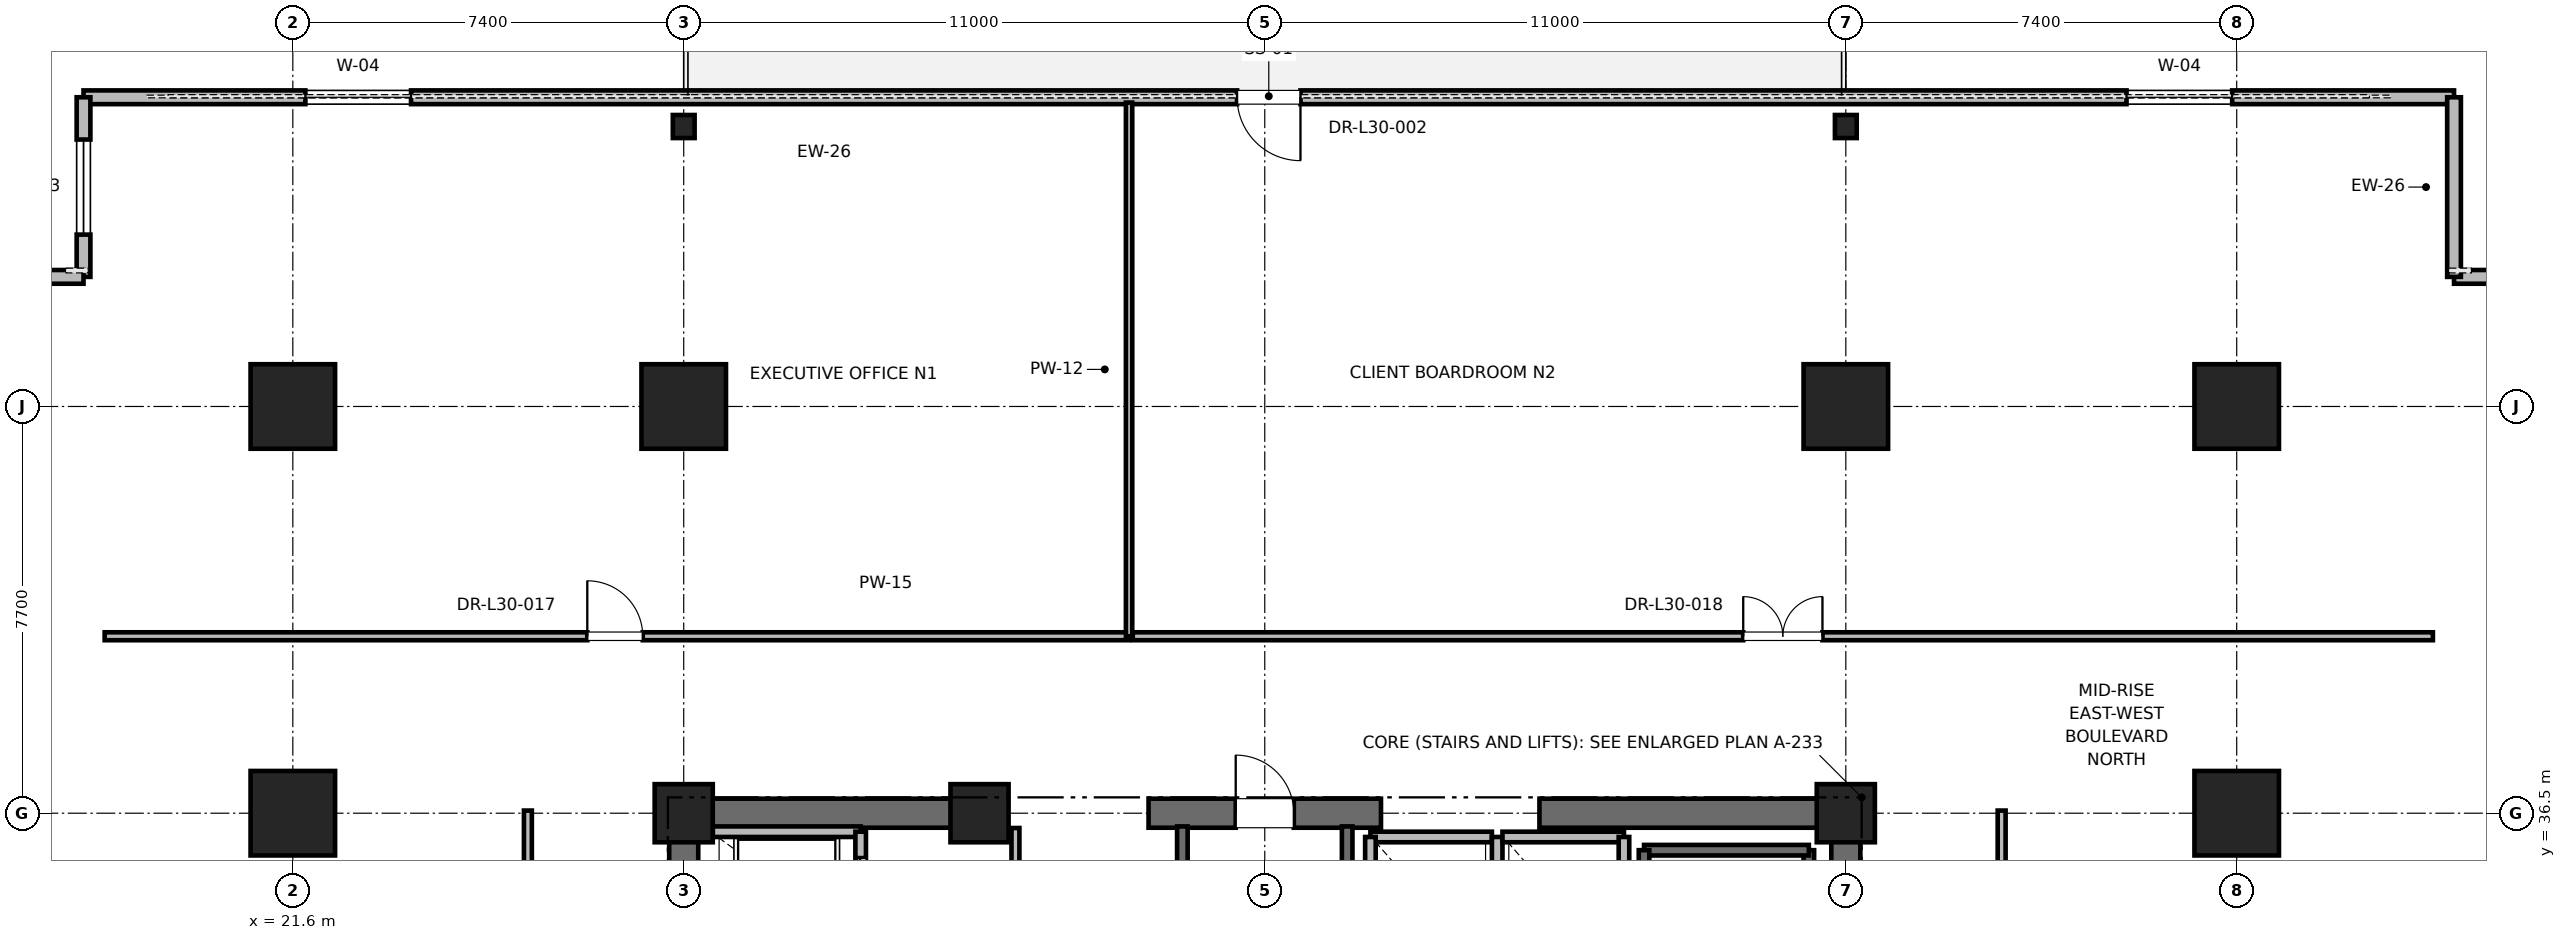
"""IFC4 building model, lengths in metres.
Left out: names, types, materials, properties, quantities, classifications, styles, units other than length and angle.
Written with IfcOpenShell. Run it as: python <this file> out.ifc"""

import sys

from ifc_helpers import new_model, si_unit, direction, frame, frame_2d, origin, origin_2d, place, context, subcontext, project, spatial, rectangle, i_section, extrude, element, fill, save


model = new_model("IFC4")
c1 = context("Model", 3, precision=1e-05, world=origin(), true_north=direction((0.0, 1.0)))
c2 = subcontext(c1, "Body", "Model", "MODEL_VIEW")
j1 = project(units=[si_unit("LENGTHUNIT", "METRE"), si_unit("PLANEANGLEUNIT", "RADIAN")], contexts=[c1])
p1 = place(None, origin())
s1 = spatial("IfcSite", under=j1, at=p1, CompositionType="ELEMENT")
p2 = place(p1, origin())
s2 = spatial("IfcBuilding", under=s1, at=p2, CompositionType="ELEMENT")
p3 = place(p2, frame((0.0, 0.0, 132.4)))
s3 = spatial("IfcBuildingStorey", under=s2, at=p3, CompositionType="ELEMENT", Elevation=132.4)
for number, where, z_axis, x_axis in (
    (1, (29.0, 44.2, 0.0), (0.0, 0.0, 1.0), (1.0, 0.0, 0.0)),
    (2, (51.0, 44.2, 0.0), (0.0, 0.0, 1.0), (1.0, 0.0, 0.0)),
    (3, (21.6, 36.5, 0.0), (0.0, 0.0, 1.0), (1.0, 0.0, 0.0)),
    (4, (58.4, 36.5, 0.0), (0.0, 0.0, 1.0), (1.0, 0.0, 0.0)),
    (5, (21.6, 44.2, 0.0), (0.0, 0.0, 1.0), (1.0, 0.0, 0.0)),
    (6, (58.4, 44.2, 0.0), (0.0, 0.0, 1.0), (1.0, 0.0, 0.0)),
):
    element("IfcColumn", number, at=place(p3, frame(where, z_axis=z_axis, x_axis=x_axis)), inside=s3, PredefinedType="COLUMN", context=c2, shape_type="SweptSolid", body=[
        extrude(rectangle(XDim=1.6, YDim=1.6, at=origin_2d()), origin(), (0.0, 0.0, 1.0), 4.0),
    ])
for number, where, z_axis, x_axis in (
    (7, (29.0, 49.5, 0.0), (0.0, 0.0, 1.0), (1.0, 0.0, 0.0)),
    (8, (51.0, 49.5, 0.0), (0.0, 0.0, 1.0), (1.0, 0.0, 0.0)),
):
    element("IfcColumn", number, at=place(p3, frame(where, z_axis=z_axis, x_axis=x_axis)), inside=s3, PredefinedType="COLUMN", context=c2, shape_type="SweptSolid", body=[
        extrude(i_section(OverallWidth=0.412, OverallDepth=0.437, WebThickness=0.036, FlangeThickness=0.058, FilletRadius=0.015, at=origin_2d()), origin(), (0.0, 0.0, 1.0), 4.0),
    ])
for number, where, z_axis, x_axis in (
    (9, (29.0, 36.5, 0.0), (0.0, 0.0, 1.0), (1.0, 0.0, 0.0)),
    (10, (51.0, 36.5, 0.0), (0.0, 0.0, 1.0), (1.0, 0.0, 0.0)),
    (11, (34.6, 36.5, 0.0), (0.0, 0.0, 1.0), (1.0, 0.0, 0.0)),
):
    element("IfcColumn", number, at=place(p3, frame(where, z_axis=z_axis, x_axis=x_axis)), inside=s3, PredefinedType="PILASTER", context=c2, shape_type="SweptSolid", body=[
        extrude(rectangle(XDim=1.1, YDim=1.1, at=origin_2d()), origin(), (0.0, 0.0, 1.0), 4.0),
    ])
p4 = place(p3, frame((29.0, 36.5, 0.0), z_axis=(0.0, 0.0, 1.0), x_axis=(1.0, 0.0, 0.0)))
e12 = element("IfcWall", 12, at=p4, inside=s3, PredefinedType="SHEAR", context=c2, shape_type="SweptSolid", body=[
    extrude(rectangle(XDim=5.8, YDim=0.55, at=frame_2d((2.9, 0.0))), origin(), (0.0, 0.0, 1.0), 3.775),
])
p5 = place(p3, frame((37.8, 36.5, 0.0), z_axis=(0.0, 0.0, 1.0), x_axis=(1.0, 0.0, 0.0)))
e13 = element("IfcWall", 13, at=p5, inside=s3, PredefinedType="SHEAR", context=c2, shape_type="SweptSolid", body=[
    extrude(rectangle(XDim=4.4, YDim=0.55, at=frame_2d((2.2, 0.0))), origin(), (0.0, 0.0, 1.0), 3.775),
])
p6 = place(p5, frame((1.65, 0.0, 0.0)))
e14 = element("IfcOpeningElement", 14, at=p6, cuts=e13, PredefinedType="OPENING", context=c2, shape_type="SweptSolid", body=[
    extrude(rectangle(XDim=1.1, YDim=2.15, at=frame_2d((0.55, 1.075))), frame((0.0, 0.275, 0.0), z_axis=(0.0, -1.0, 0.0), x_axis=(1.0, 0.0, 0.0)), (0.0, 0.0, 1.0), 0.55),
])
for number, where, z_axis, x_axis in (
    (15, (45.2, 36.5, 0.0), (0.0, 0.0, 1.0), (1.0, 0.0, 0.0)),
    (16, (29.0, 30.7, 0.0), (0.0, 0.0, 1.0), (0.0, 1.0, 0.0)),
):
    element("IfcWall", number, at=place(p3, frame(where, z_axis=z_axis, x_axis=x_axis)), inside=s3, PredefinedType="SHEAR", context=c2, shape_type="SweptSolid", body=[
        extrude(rectangle(XDim=5.8, YDim=0.55, at=frame_2d((2.9, 0.0))), origin(), (0.0, 0.0, 1.0), 3.775),
    ])
p7 = place(p3, frame((51.0, 27.7, 0.0), z_axis=(0.0, 0.0, 1.0), x_axis=(0.0, 1.0, 0.0)))
e17 = element("IfcWall", 17, at=p7, inside=s3, PredefinedType="SHEAR", context=c2, shape_type="SweptSolid", body=[
    extrude(rectangle(XDim=8.8, YDim=0.55, at=frame_2d((4.4, 0.0))), origin(), (0.0, 0.0, 1.0), 3.775),
])
p8 = place(p3, frame((62.514, 50.054, 0.0), z_axis=(0.0, 0.0, 1.0), x_axis=(-1.0, 0.0, 0.0)))
e18 = element("IfcWall", 18, at=p8, inside=s3, PredefinedType="PARAPET", context=c2, shape_type="SweptSolid", body=[
    extrude(rectangle(XDim=44.876, YDim=0.26, at=frame_2d((22.438, 0.0))), origin(), (0.0, 0.0, 1.0), 2.97),
])
p9 = place(p8, frame((4.2, 0.0, 0.85)))
e19 = element("IfcOpeningElement", 19, at=p9, cuts=e18, PredefinedType="OPENING", context=c2, shape_type="SweptSolid", body=[
    extrude(rectangle(XDim=2.0, YDim=2.3, at=frame_2d((1.0, 1.15))), frame((0.0, 0.13, 0.0), z_axis=(0.0, -1.0, 0.0), x_axis=(1.0, 0.0, 0.0)), (0.0, 0.0, 1.0), 0.26),
])
p10 = place(p8, frame((21.838, 0.0, 0.0)))
e20 = element("IfcOpeningElement", 20, at=p10, cuts=e18, PredefinedType="OPENING", context=c2, shape_type="SweptSolid", body=[
    extrude(rectangle(XDim=1.2, YDim=2.2, at=frame_2d((0.6, 1.1))), frame((0.0, 0.13, 0.0), z_axis=(0.0, -1.0, 0.0), x_axis=(1.0, 0.0, 0.0)), (0.0, 0.0, 1.0), 0.26),
])
p11 = place(p8, frame((38.677, 0.0, 0.85)))
e21 = element("IfcOpeningElement", 21, at=p11, cuts=e18, PredefinedType="OPENING", context=c2, shape_type="SweptSolid", body=[
    extrude(rectangle(XDim=2.0, YDim=2.3, at=frame_2d((1.0, 1.15))), frame((0.0, 0.13, 0.0), z_axis=(0.0, -1.0, 0.0), x_axis=(1.0, 0.0, 0.0)), (0.0, 0.0, 1.0), 0.26),
])
p12 = place(p3, frame((66.314, 46.654, 0.0), z_axis=(0.0, 0.0, 1.0), x_axis=(-1.0, 0.0, 0.0)))
e22 = element("IfcWall", 22, at=p12, inside=s3, PredefinedType="PARAPET", context=c2, shape_type="SweptSolid", body=[
    extrude(rectangle(XDim=3.8, YDim=0.26, at=frame_2d((1.9, 0.0))), origin(), (0.0, 0.0, 1.0), 3.775),
])
p13 = place(p12, frame((1.0, 0.0, 0.85)))
e23 = element("IfcOpeningElement", 23, at=p13, cuts=e22, PredefinedType="OPENING", context=c2, shape_type="SweptSolid", body=[
    extrude(rectangle(XDim=1.8, YDim=2.2, at=frame_2d((0.9, 1.1))), frame((0.0, 0.13, 0.0), z_axis=(0.0, -1.0, 0.0), x_axis=(1.0, 0.0, 0.0)), (0.0, 0.0, 1.0), 0.26),
])
p14 = place(p3, frame((62.514, 46.654, 0.0), z_axis=(0.0, 0.0, 1.0), x_axis=(0.0, 1.0, 0.0)))
e24 = element("IfcWall", 24, at=p14, inside=s3, PredefinedType="PARAPET", context=c2, shape_type="SweptSolid", body=[
    extrude(rectangle(XDim=3.4, YDim=0.26, at=frame_2d((1.7, 0.0))), origin(), (0.0, 0.0, 1.0), 3.775),
])
p15 = place(p3, frame((17.638, 50.054, 0.0), z_axis=(0.0, 0.0, 1.0), x_axis=(0.0, -1.0, 0.0)))
e25 = element("IfcWall", 25, at=p15, inside=s3, PredefinedType="PARAPET", context=c2, shape_type="SweptSolid", body=[
    extrude(rectangle(XDim=3.4, YDim=0.26, at=frame_2d((1.7, 0.0))), origin(), (0.0, 0.0, 1.0), 3.775),
])
p16 = place(p15, frame((0.8, 0.0, 0.85)))
e26 = element("IfcOpeningElement", 26, at=p16, cuts=e25, PredefinedType="OPENING", context=c2, shape_type="SweptSolid", body=[
    extrude(rectangle(XDim=1.8, YDim=2.2, at=frame_2d((0.9, 1.1))), frame((0.0, 0.13, 0.0), z_axis=(0.0, -1.0, 0.0), x_axis=(1.0, 0.0, 0.0)), (0.0, 0.0, 1.0), 0.26),
])
p17 = place(p3, frame((17.638, 46.654, 0.0), z_axis=(0.0, 0.0, 1.0), x_axis=(-1.0, 0.0, 0.0)))
e27 = element("IfcWall", 27, at=p17, inside=s3, PredefinedType="PARAPET", context=c2, shape_type="SweptSolid", body=[
    extrude(rectangle(XDim=3.8, YDim=0.26, at=frame_2d((1.9, 0.0))), origin(), (0.0, 0.0, 1.0), 3.775),
])
p18 = place(p3, frame((50.3, 27.65, 0.0), z_axis=(0.0, 0.0, 1.0), x_axis=(0.0, 1.0, 0.0)))
e28 = element("IfcWall", 28, at=p18, inside=s3, PredefinedType="SOLIDWALL", context=c2, shape_type="SweptSolid", body=[
    extrude(rectangle(XDim=8.15, YDim=0.2, at=frame_2d((4.075, 0.0))), origin(), (0.0, 0.0, 1.0), 3.775),
])
p19 = place(p3, frame((47.18, 35.8, 0.0), z_axis=(0.0, 0.0, 1.0), x_axis=(1.0, 0.0, 0.0)))
e29 = element("IfcWall", 29, at=p19, inside=s3, PredefinedType="SOLIDWALL", context=c2, shape_type="SweptSolid", body=[
    extrude(rectangle(XDim=3.12, YDim=0.2, at=frame_2d((1.56, 0.0))), origin(), (0.0, 0.0, 1.0), 3.775),
])
p20 = place(p3, frame((47.18, 27.62, 0.0), z_axis=(0.0, 0.0, 1.0), x_axis=(0.0, 1.0, 0.0)))
e30 = element("IfcWall", 30, at=p20, inside=s3, PredefinedType="SOLIDWALL", context=c2, shape_type="SweptSolid", body=[
    extrude(rectangle(XDim=8.18, YDim=0.2, at=frame_2d((4.09, 0.0))), origin(), (0.0, 0.0, 1.0), 3.775),
])
p21 = place(p3, frame((38.44, 27.38, 0.0), z_axis=(0.0, 0.0, 1.0), x_axis=(0.0, 1.0, 0.0)))
e31 = element("IfcWall", 31, at=p21, inside=s3, PredefinedType="SOLIDWALL", context=c2, shape_type="SweptSolid", body=[
    extrude(rectangle(XDim=8.87, YDim=0.2, at=frame_2d((4.435, 0.0))), origin(), (0.0, 0.0, 1.0), 3.775),
])
p22 = place(p3, frame((41.56, 27.68, 0.0), z_axis=(0.0, 0.0, 1.0), x_axis=(0.0, 1.0, 0.0)))
e32 = element("IfcWall", 32, at=p22, inside=s3, PredefinedType="SOLIDWALL", context=c2, shape_type="SweptSolid", body=[
    extrude(rectangle(XDim=8.57, YDim=0.2, at=frame_2d((4.285, 0.0))), origin(), (0.0, 0.0, 1.0), 3.775),
])
p23 = place(p3, frame((32.35, 36.15, 0.0), z_axis=(0.0, 0.0, 1.0), x_axis=(-1.0, 0.0, 0.0)))
e33 = element("IfcWall", 33, at=p23, inside=s3, PredefinedType="SOLIDWALL", context=c2, shape_type="SweptSolid", body=[
    extrude(rectangle(XDim=2.8, YDim=0.2, at=frame_2d((1.4, 0.0))), origin(), (0.0, 0.0, 1.0), 2.985),
])
p24 = place(p3, frame((32.35, 34.05, 0.0), z_axis=(0.0, 0.0, 1.0), x_axis=(0.0, 1.0, 0.0)))
e34 = element("IfcWall", 34, at=p24, inside=s3, PredefinedType="SOLIDWALL", context=c2, shape_type="SweptSolid", body=[
    extrude(rectangle(XDim=2.1, YDim=0.2, at=frame_2d((1.05, 0.0))), origin(), (0.0, 0.0, 1.0), 3.775),
])
p25 = place(p24, frame((0.5, 0.0, 0.0)))
e35 = element("IfcOpeningElement", 35, at=p25, cuts=e34, PredefinedType="OPENING", context=c2, shape_type="SweptSolid", body=[
    extrude(rectangle(XDim=1.1, YDim=2.2, at=frame_2d((0.55, 1.1))), frame((0.0, 0.1, 0.0), z_axis=(0.0, -1.0, 0.0), x_axis=(1.0, 0.0, 0.0)), (0.0, 0.0, 1.0), 0.2),
])
p26 = place(p3, frame((44.3, 36.05, 0.0), z_axis=(0.0, 0.0, 1.0), x_axis=(-1.0, 0.0, 0.0)))
e36 = element("IfcWall", 36, at=p26, inside=s3, PredefinedType="SOLIDWALL", context=c2, shape_type="SweptSolid", body=[
    extrude(rectangle(XDim=2.3, YDim=0.2, at=frame_2d((1.15, 0.0))), origin(), (0.0, 0.0, 1.0), 2.755),
])
for number, where, z_axis, x_axis in (
    (37, (42.0, 36.05, 0.0), (0.0, 0.0, 1.0), (0.0, -1.0, 0.0)),
    (38, (44.4, 33.45, 0.0), (0.0, 0.0, 1.0), (0.0, 1.0, 0.0)),
):
    element("IfcWall", number, at=place(p3, frame(where, z_axis=z_axis, x_axis=x_axis)), inside=s3, PredefinedType="SOLIDWALL", context=c2, shape_type="SweptSolid", body=[
        extrude(rectangle(XDim=2.6, YDim=0.2, at=frame_2d((1.3, 0.0))), origin(), (0.0, 0.0, 1.0), 2.755),
    ])
p27 = place(p3, frame((46.8, 36.05, 0.0), z_axis=(0.0, 0.0, 1.0), x_axis=(-1.0, 0.0, 0.0)))
e39 = element("IfcWall", 39, at=p27, inside=s3, PredefinedType="SOLIDWALL", context=c2, shape_type="SweptSolid", body=[
    extrude(rectangle(XDim=2.3, YDim=0.2, at=frame_2d((1.15, 0.0))), origin(), (0.0, 0.0, 1.0), 2.755),
])
p28 = place(p3, frame((46.8, 33.45, 0.0), z_axis=(0.0, 0.0, 1.0), x_axis=(0.0, 1.0, 0.0)))
e40 = element("IfcWall", 40, at=p28, inside=s3, PredefinedType="SOLIDWALL", context=c2, shape_type="SweptSolid", body=[
    extrude(rectangle(XDim=2.6, YDim=0.2, at=frame_2d((1.3, 0.0))), origin(), (0.0, 0.0, 1.0), 3.775),
])
p29 = place(p3, frame((35.28, 33.95, 0.0), z_axis=(0.0, 0.0, 1.0), x_axis=(0.0, 1.0, 0.0)))
e41 = element("IfcWall", 41, at=p29, inside=s3, PredefinedType="PARTITIONING", context=c2, shape_type="SweptSolid", body=[
    extrude(rectangle(XDim=2.27, YDim=0.15, at=frame_2d((1.135, 0.0))), origin(), (0.0, 0.0, 1.0), 2.755),
])
p30 = place(p29, frame((0.66, 0.0, 0.0)))
e42 = element("IfcOpeningElement", 42, at=p30, cuts=e41, PredefinedType="OPENING", context=c2, shape_type="SweptSolid", body=[
    extrude(rectangle(XDim=0.95, YDim=2.15, at=frame_2d((0.475, 1.075))), frame((0.0, 0.075, 0.0), z_axis=(0.0, -1.0, 0.0), x_axis=(1.0, 0.0, 0.0)), (0.0, 0.0, 1.0), 0.15),
])
p31 = place(p3, frame((18.038, 39.85, 0.0), z_axis=(0.0, 0.0, 1.0), x_axis=(1.0, 0.0, 0.0)))
e43 = element("IfcWall", 43, at=p31, inside=s3, PredefinedType="PARTITIONING", context=c2, shape_type="SweptSolid", body=[
    extrude(rectangle(XDim=19.394, YDim=0.15, at=frame_2d((9.697, 0.0))), origin(), (0.0, 0.0, 1.0), 2.85),
])
p32 = place(p31, frame((9.137, 0.0, 0.0)))
e44 = element("IfcOpeningElement", 44, at=p32, cuts=e43, PredefinedType="OPENING", context=c2, shape_type="SweptSolid", body=[
    extrude(rectangle(XDim=1.05, YDim=2.2, at=frame_2d((0.525, 1.1))), frame((0.0, 0.075, 0.0), z_axis=(0.0, -1.0, 0.0), x_axis=(1.0, 0.0, 0.0)), (0.0, 0.0, 1.0), 0.15),
])
p33 = place(p3, frame((37.431, 39.85, 0.0), z_axis=(0.0, 0.0, 1.0), x_axis=(0.0, 1.0, 0.0)))
e45 = element("IfcWall", 45, at=p33, inside=s3, PredefinedType="PARTITIONING", context=c2, shape_type="SweptSolid", body=[
    extrude(rectangle(XDim=10.104, YDim=0.12, at=frame_2d((5.052, 0.0))), origin(), (0.0, 0.0, 1.0), 2.405),
])
p34 = place(p3, frame((37.501, 39.85, 0.0), z_axis=(0.0, 0.0, 1.0), x_axis=(1.0, 0.0, 0.0)))
e46 = element("IfcWall", 46, at=p34, inside=s3, PredefinedType="PARTITIONING", context=c2, shape_type="SweptSolid", body=[
    extrude(rectangle(XDim=24.613, YDim=0.15, at=frame_2d((12.306, 0.0))), origin(), (0.0, 0.0, 1.0), 2.85),
])
p35 = place(p34, frame((11.556, 0.0, 0.0)))
e47 = element("IfcOpeningElement", 47, at=p35, cuts=e46, PredefinedType="OPENING", context=c2, shape_type="SweptSolid", body=[
    extrude(rectangle(XDim=1.5, YDim=2.25, at=frame_2d((0.75, 1.125))), frame((0.0, 0.075, 0.0), z_axis=(0.0, -1.0, 0.0), x_axis=(1.0, 0.0, 0.0)), (0.0, 0.0, 1.0), 0.15),
])
p36 = place(p3, frame((26.05, 26.122, 0.0), z_axis=(0.0, 0.0, 1.0), x_axis=(0.0, 1.0, 0.0)))
e48 = element("IfcWall", 48, at=p36, inside=s3, PredefinedType="PARTITIONING", context=c2, shape_type="SweptSolid", body=[
    extrude(rectangle(XDim=10.428, YDim=0.15, at=frame_2d((5.214, 0.0))), origin(), (0.0, 0.0, 1.0), 2.85),
])
p37 = place(p36, frame((4.639, 0.0, 0.0)))
e49 = element("IfcOpeningElement", 49, at=p37, cuts=e48, PredefinedType="OPENING", context=c2, shape_type="SweptSolid", body=[
    extrude(rectangle(XDim=1.0, YDim=2.15, at=frame_2d((0.5, 1.075))), frame((0.0, 0.075, 0.0), z_axis=(0.0, -1.0, 0.0), x_axis=(1.0, 0.0, 0.0)), (0.0, 0.0, 1.0), 0.15),
])
p38 = place(p3, frame((53.95, 18.45, 0.0), z_axis=(0.0, 0.0, 1.0), x_axis=(0.0, 1.0, 0.0)))
e50 = element("IfcWall", 50, at=p38, inside=s3, PredefinedType="PARTITIONING", context=c2, shape_type="SweptSolid", body=[
    extrude(rectangle(XDim=18.1, YDim=0.15, at=frame_2d((9.05, 0.0))), origin(), (0.0, 0.0, 1.0), 2.85),
])
p39 = place(p38, frame((8.55, 0.0, 0.0)))
e51 = element("IfcOpeningElement", 51, at=p39, cuts=e50, PredefinedType="OPENING", context=c2, shape_type="SweptSolid", body=[
    extrude(rectangle(XDim=1.0, YDim=2.15, at=frame_2d((0.5, 1.075))), frame((0.0, 0.075, 0.0), z_axis=(0.0, -1.0, 0.0), x_axis=(1.0, 0.0, 0.0)), (0.0, 0.0, 1.0), 0.15),
])
p40 = place(p9, origin())
e52 = element("IfcWindow", 52, at=p40, inside=s3, PartitioningType="SINGLE_PANEL", PredefinedType="WINDOW", context=c2, shape_type="SweptSolid", body=[
    extrude(rectangle(XDim=2.0, YDim=2.3, at=frame_2d((1.0, 1.15))), frame((0.0, 0.03, 0.0), z_axis=(0.0, -1.0, 0.0), x_axis=(1.0, 0.0, 0.0)), (0.0, 0.0, 1.0), 0.06),
])
fill(e19, e52)
p41 = place(p10, origin())
e53 = element("IfcDoor", 53, at=p41, inside=s3, OperationType="SINGLE_SWING_LEFT", PredefinedType="DOOR", context=c2, shape_type="SweptSolid", body=[
    extrude(rectangle(XDim=1.2, YDim=2.2, at=frame_2d((0.6, 1.1))), frame((0.0, 0.025, 0.0), z_axis=(0.0, -1.0, 0.0), x_axis=(1.0, 0.0, 0.0)), (0.0, 0.0, 1.0), 0.05),
])
fill(e20, e53)
p42 = place(p11, origin())
e54 = element("IfcWindow", 54, at=p42, inside=s3, PartitioningType="SINGLE_PANEL", PredefinedType="WINDOW", context=c2, shape_type="SweptSolid", body=[
    extrude(rectangle(XDim=2.0, YDim=2.3, at=frame_2d((1.0, 1.15))), frame((0.0, 0.03, 0.0), z_axis=(0.0, -1.0, 0.0), x_axis=(1.0, 0.0, 0.0)), (0.0, 0.0, 1.0), 0.06),
])
fill(e21, e54)
p43 = place(p16, origin())
e55 = element("IfcWindow", 55, at=p43, inside=s3, PartitioningType="SINGLE_PANEL", PredefinedType="WINDOW", context=c2, shape_type="SweptSolid", body=[
    extrude(rectangle(XDim=1.8, YDim=2.2, at=frame_2d((0.9, 1.1))), frame((0.0, 0.03, 0.0), z_axis=(0.0, -1.0, 0.0), x_axis=(1.0, 0.0, 0.0)), (0.0, 0.0, 1.0), 0.06),
])
fill(e26, e55)
p44 = place(p6, origin())
e56 = element("IfcDoor", 56, at=p44, inside=s3, OperationType="SINGLE_SWING_LEFT", PredefinedType="DOOR", context=c2, shape_type="SweptSolid", body=[
    extrude(rectangle(XDim=1.1, YDim=2.15, at=frame_2d((0.55, 1.075))), frame((0.0, 0.025, 0.0), z_axis=(0.0, -1.0, 0.0), x_axis=(1.0, 0.0, 0.0)), (0.0, 0.0, 1.0), 0.05),
])
fill(e14, e56)
p45 = place(p25, origin())
e57 = element("IfcDoor", 57, at=p45, inside=s3, OperationType="SLIDING_TO_RIGHT", PredefinedType="DOOR", context=c2, shape_type="SweptSolid", body=[
    extrude(rectangle(XDim=1.1, YDim=2.2, at=frame_2d((0.55, 1.1))), frame((0.0, 0.025, 0.0), z_axis=(0.0, -1.0, 0.0), x_axis=(1.0, 0.0, 0.0)), (0.0, 0.0, 1.0), 0.05),
])
fill(e35, e57)
p46 = place(p32, origin())
e58 = element("IfcDoor", 58, at=p46, inside=s3, OperationType="SINGLE_SWING_LEFT", PredefinedType="DOOR", context=c2, shape_type="SweptSolid", body=[
    extrude(rectangle(XDim=1.05, YDim=2.2, at=frame_2d((0.525, 1.1))), frame((0.0, 0.025, 0.0), z_axis=(0.0, -1.0, 0.0), x_axis=(1.0, 0.0, 0.0)), (0.0, 0.0, 1.0), 0.05),
])
fill(e44, e58)
p47 = place(p35, origin())
e59 = element("IfcDoor", 59, at=p47, inside=s3, OperationType="DOUBLE_DOOR_SINGLE_SWING", PredefinedType="DOOR", context=c2, shape_type="SweptSolid", body=[
    extrude(rectangle(XDim=1.5, YDim=2.25, at=frame_2d((0.75, 1.125))), frame((0.0, 0.025, 0.0), z_axis=(0.0, -1.0, 0.0), x_axis=(1.0, 0.0, 0.0)), (0.0, 0.0, 1.0), 0.05),
])
fill(e47, e59)
save(model, sys.argv[1])
